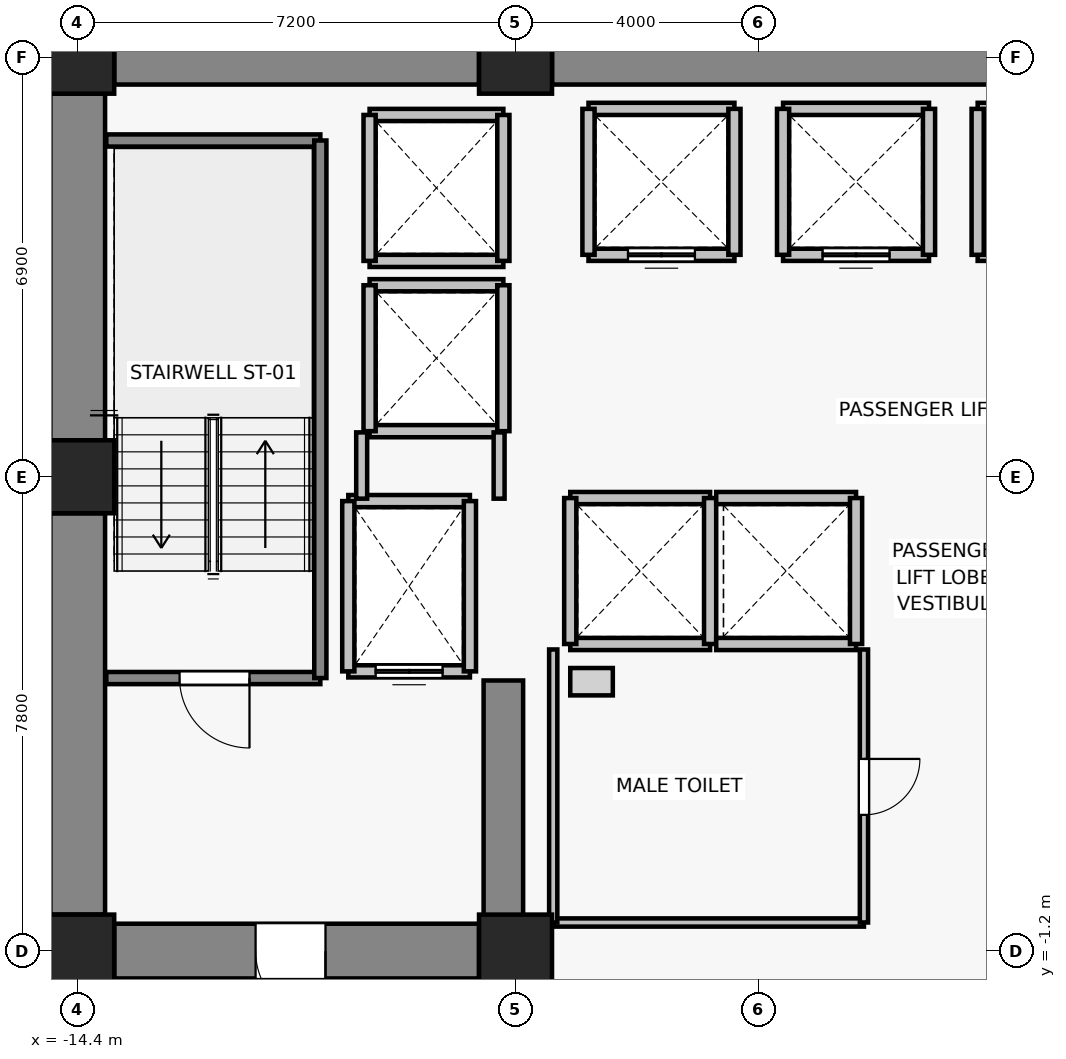
"""IFC4 building model, lengths in metres.
Left out: names, types, materials, properties, quantities, classifications, styles, units other than length and angle.
Written with IfcOpenShell. Run it as: python <this file> out.ifc"""

import sys

from ifc_helpers import new_model, si_unit, direction, frame, frame_2d, origin, origin_2d, place, context, subcontext, project, spatial, rectangle, extrude, source, transform, mapped, element, fill, save


model = new_model("IFC4")
c1 = context("Model", 3, precision=1e-05, world=origin(), true_north=direction((0.0, 1.0)))
c2 = subcontext(c1, "Body", "Model", "MODEL_VIEW")
j1 = project(units=[si_unit("LENGTHUNIT", "METRE"), si_unit("PLANEANGLEUNIT", "RADIAN")], contexts=[c1])
p1 = place(None, origin())
s1 = spatial("IfcSite", under=j1, at=p1, CompositionType="ELEMENT")
p2 = place(p1, origin())
s2 = spatial("IfcBuilding", under=s1, at=p2, CompositionType="ELEMENT")
p3 = place(p2, frame((0.0, 0.0, 73.6)))
s3 = spatial("IfcBuildingStorey", under=s2, at=p3, CompositionType="ELEMENT", Elevation=73.6)
for number, where, z_axis, x_axis in (
    (1, (-14.4, -1.2, 0.0), (0.0, 0.0, 1.0), (1.0, 0.0, 0.0)),
    (2, (-7.2, -1.2, 0.0), (0.0, 0.0, 1.0), (1.0, 0.0, 0.0)),
    (3, (-14.4, 6.6, 0.0), (0.0, 0.0, 1.0), (1.0, 0.0, 0.0)),
    (4, (-14.4, 13.5, 0.0), (0.0, 0.0, 1.0), (1.0, 0.0, 0.0)),
    (5, (-7.2, 13.5, 0.0), (0.0, 0.0, 1.0), (1.0, 0.0, 0.0)),
):
    element("IfcColumn", number, at=place(p3, frame(where, z_axis=z_axis, x_axis=x_axis)), inside=s3, PredefinedType="COLUMN", context=c2, shape_type="SweptSolid", body=[
        extrude(rectangle(XDim=1.2, YDim=1.2, at=origin_2d()), origin(), (0.0, 0.0, 1.0), 3.3),
    ])
p4 = place(p3, frame((-13.8, 13.5, 0.0), z_axis=(0.0, 0.0, 1.0), x_axis=(1.0, 0.0, 0.0)))
e6 = element("IfcWall", 6, at=p4, inside=s3, PredefinedType="SHEAR", context=c2, shape_type="SweptSolid", body=[
    extrude(rectangle(XDim=6.0, YDim=0.9, at=frame_2d((3.0, 0.0))), origin(), (0.0, 0.0, 1.0), 3.075),
])
p5 = place(p3, frame((-6.6, 13.5, 0.0), z_axis=(0.0, 0.0, 1.0), x_axis=(1.0, 0.0, 0.0)))
e7 = element("IfcWall", 7, at=p5, inside=s3, PredefinedType="SHEAR", context=c2, shape_type="SweptSolid", body=[
    extrude(rectangle(XDim=13.2, YDim=0.9, at=frame_2d((6.6, 0.0))), origin(), (0.0, 0.0, 1.0), 3.075),
])
p6 = place(p3, frame((-14.4, -0.6, 0.0), z_axis=(0.0, 0.0, 1.0), x_axis=(0.0, 1.0, 0.0)))
e8 = element("IfcWall", 8, at=p6, inside=s3, PredefinedType="SHEAR", context=c2, shape_type="SweptSolid", body=[
    extrude(rectangle(XDim=6.6, YDim=0.9, at=frame_2d((3.3, 0.0))), origin(), (0.0, 0.0, 1.0), 3.075),
])
p7 = place(p3, frame((-14.4, 7.2, 0.0), z_axis=(0.0, 0.0, 1.0), x_axis=(0.0, 1.0, 0.0)))
e9 = element("IfcWall", 9, at=p7, inside=s3, PredefinedType="SHEAR", context=c2, shape_type="SweptSolid", body=[
    extrude(rectangle(XDim=5.7, YDim=0.9, at=frame_2d((2.85, 0.0))), origin(), (0.0, 0.0, 1.0), 3.075),
])
p8 = place(p3, frame((-7.8, -1.2, 0.0), z_axis=(0.0, 0.0, 1.0), x_axis=(-1.0, 0.0, 0.0)))
e10 = element("IfcWall", 10, at=p8, inside=s3, PredefinedType="SHEAR", context=c2, shape_type="SweptSolid", body=[
    extrude(rectangle(XDim=6.0, YDim=0.9, at=frame_2d((3.0, 0.0))), origin(), (0.0, 0.0, 1.0), 3.075),
])
p9 = place(p8, frame((2.525, 0.0, 0.0)))
e11 = element("IfcOpeningElement", 11, at=p9, cuts=e10, PredefinedType="OPENING", context=c2, shape_type="SweptSolid", body=[
    extrude(rectangle(XDim=1.15, YDim=2.15, at=frame_2d((0.575, 1.075))), frame((0.0, 0.46, 0.0), z_axis=(0.0, -1.0, 0.0), x_axis=(1.0, 0.0, 0.0)), (0.0, 0.0, 1.0), 0.92),
])
p10 = place(p3, frame((-7.4, -0.75, 0.0), z_axis=(0.0, 0.0, 1.0), x_axis=(0.0, 1.0, 0.0)))
e12 = element("IfcWall", 12, at=p10, inside=s3, PredefinedType="SHEAR", context=c2, shape_type="SweptSolid", body=[
    extrude(rectangle(XDim=4.0, YDim=0.65, at=frame_2d((2.0, 0.0))), origin(), (0.0, 0.0, 1.0), 3.075),
])
p11 = place(p3, frame((-7.95, 3.4, 0.0), z_axis=(0.0, 0.0, 1.0), x_axis=(-1.0, 0.0, 0.0)))
e13 = element("IfcWall", 13, at=p11, inside=s3, PredefinedType="SOLIDWALL", context=c2, shape_type="SweptSolid", body=[
    extrude(rectangle(XDim=2.0, YDim=0.2, at=frame_2d((1.0, 0.0))), origin(), (0.0, 0.0, 1.0), 3.075),
])
p12 = place(p11, frame((0.45, 0.0, 0.0)))
e14 = element("IfcOpeningElement", 14, at=p12, cuts=e13, PredefinedType="OPENING", context=c2, shape_type="SweptSolid", body=[
    extrude(rectangle(XDim=1.1, YDim=2.2, at=frame_2d((0.55, 1.1))), frame((0.0, 0.11, 0.0), z_axis=(0.0, -1.0, 0.0), x_axis=(1.0, 0.0, 0.0)), (0.0, 0.0, 1.0), 0.22),
])
p13 = place(p3, frame((-9.95, 6.2, 0.0), z_axis=(0.0, 0.0, 1.0), x_axis=(1.0, 0.0, 0.0)))
e15 = element("IfcWall", 15, at=p13, inside=s3, PredefinedType="SOLIDWALL", context=c2, shape_type="SweptSolid", body=[
    extrude(rectangle(XDim=2.0, YDim=0.2, at=frame_2d((1.0, 0.0))), origin(), (0.0, 0.0, 1.0), 3.075),
])
for number, where, z_axis, x_axis in (
    (16, (-9.95, 3.4, 0.0), (0.0, 0.0, 1.0), (0.0, 1.0, 0.0)),
    (17, (-7.95, 6.2, 0.0), (0.0, 0.0, 1.0), (0.0, -1.0, 0.0)),
):
    element("IfcWall", number, at=place(p3, frame(where, z_axis=z_axis, x_axis=x_axis)), inside=s3, PredefinedType="SOLIDWALL", context=c2, shape_type="SweptSolid", body=[
        extrude(rectangle(XDim=2.8, YDim=0.2, at=frame_2d((1.4, 0.0))), origin(), (0.0, 0.0, 1.0), 3.075),
    ])
p14 = place(p3, frame((-3.6, 10.25, 0.0), z_axis=(0.0, 0.0, 1.0), x_axis=(-1.0, 0.0, 0.0)))
e18 = element("IfcWall", 18, at=p14, inside=s3, PredefinedType="SOLIDWALL", context=c2, shape_type="SweptSolid", body=[
    extrude(rectangle(XDim=2.4, YDim=0.2, at=frame_2d((1.2, 0.0))), origin(), (0.0, 0.0, 1.0), 3.075),
])
p15 = place(p14, frame((0.65, 0.0, 0.0)))
e19 = element("IfcOpeningElement", 19, at=p15, cuts=e18, PredefinedType="OPENING", context=c2, shape_type="SweptSolid", body=[
    extrude(rectangle(XDim=1.1, YDim=2.2, at=frame_2d((0.55, 1.1))), frame((0.0, 0.11, 0.0), z_axis=(0.0, -1.0, 0.0), x_axis=(1.0, 0.0, 0.0)), (0.0, 0.0, 1.0), 0.22),
])
for number, where, z_axis, x_axis in (
    (20, (-6.0, 12.65, 0.0), (0.0, 0.0, 1.0), (1.0, 0.0, 0.0)),
    (21, (-6.0, 10.25, 0.0), (0.0, 0.0, 1.0), (0.0, 1.0, 0.0)),
    (22, (-3.6, 12.65, 0.0), (0.0, 0.0, 1.0), (0.0, -1.0, 0.0)),
):
    element("IfcWall", number, at=place(p3, frame(where, z_axis=z_axis, x_axis=x_axis)), inside=s3, PredefinedType="SOLIDWALL", context=c2, shape_type="SweptSolid", body=[
        extrude(rectangle(XDim=2.4, YDim=0.2, at=frame_2d((1.2, 0.0))), origin(), (0.0, 0.0, 1.0), 3.075),
    ])
p16 = place(p3, frame((-0.4, 10.25, 0.0), z_axis=(0.0, 0.0, 1.0), x_axis=(-1.0, 0.0, 0.0)))
e23 = element("IfcWall", 23, at=p16, inside=s3, PredefinedType="SOLIDWALL", context=c2, shape_type="SweptSolid", body=[
    extrude(rectangle(XDim=2.4, YDim=0.2, at=frame_2d((1.2, 0.0))), origin(), (0.0, 0.0, 1.0), 3.075),
])
p17 = place(p16, frame((0.65, 0.0, 0.0)))
e24 = element("IfcOpeningElement", 24, at=p17, cuts=e23, PredefinedType="OPENING", context=c2, shape_type="SweptSolid", body=[
    extrude(rectangle(XDim=1.1, YDim=2.2, at=frame_2d((0.55, 1.1))), frame((0.0, 0.11, 0.0), z_axis=(0.0, -1.0, 0.0), x_axis=(1.0, 0.0, 0.0)), (0.0, 0.0, 1.0), 0.22),
])
p18 = place(p3, frame((-2.8, 12.65, 0.0), z_axis=(0.0, 0.0, 1.0), x_axis=(1.0, 0.0, 0.0)))
e25 = element("IfcWall", 25, at=p18, inside=s3, PredefinedType="SOLIDWALL", context=c2, shape_type="SweptSolid", body=[
    extrude(rectangle(XDim=2.4, YDim=0.2, at=frame_2d((1.2, 0.0))), origin(), (0.0, 0.0, 1.0), 3.075),
])
for number, where, z_axis, x_axis in (
    (26, (-2.8, 10.25, 0.0), (0.0, 0.0, 1.0), (0.0, 1.0, 0.0)),
    (27, (-0.4, 12.65, 0.0), (0.0, 0.0, 1.0), (0.0, -1.0, 0.0)),
):
    element("IfcWall", number, at=place(p3, frame(where, z_axis=z_axis, x_axis=x_axis)), inside=s3, PredefinedType="SOLIDWALL", context=c2, shape_type="SweptSolid", body=[
        extrude(rectangle(XDim=2.4, YDim=0.2, at=frame_2d((1.2, 0.0))), origin(), (0.0, 0.0, 1.0), 3.075),
    ])
p19 = place(p3, frame((2.8, 10.25, 0.0), z_axis=(0.0, 0.0, 1.0), x_axis=(-1.0, 0.0, 0.0)))
e28 = element("IfcWall", 28, at=p19, inside=s3, PredefinedType="SOLIDWALL", context=c2, shape_type="SweptSolid", body=[
    extrude(rectangle(XDim=2.4, YDim=0.2, at=frame_2d((1.2, 0.0))), origin(), (0.0, 0.0, 1.0), 3.075),
])
p20 = place(p19, frame((0.65, 0.0, 0.0)))
e29 = element("IfcOpeningElement", 29, at=p20, cuts=e28, PredefinedType="OPENING", context=c2, shape_type="SweptSolid", body=[
    extrude(rectangle(XDim=1.1, YDim=2.2, at=frame_2d((0.55, 1.1))), frame((0.0, 0.11, 0.0), z_axis=(0.0, -1.0, 0.0), x_axis=(1.0, 0.0, 0.0)), (0.0, 0.0, 1.0), 0.22),
])
p21 = place(p3, frame((0.4, 12.65, 0.0), z_axis=(0.0, 0.0, 1.0), x_axis=(1.0, 0.0, 0.0)))
e30 = element("IfcWall", 30, at=p21, inside=s3, PredefinedType="SOLIDWALL", context=c2, shape_type="SweptSolid", body=[
    extrude(rectangle(XDim=2.4, YDim=0.2, at=frame_2d((1.2, 0.0))), origin(), (0.0, 0.0, 1.0), 3.075),
])
p22 = place(p3, frame((0.4, 10.25, 0.0), z_axis=(0.0, 0.0, 1.0), x_axis=(0.0, 1.0, 0.0)))
e31 = element("IfcWall", 31, at=p22, inside=s3, PredefinedType="SOLIDWALL", context=c2, shape_type="SweptSolid", body=[
    extrude(rectangle(XDim=2.4, YDim=0.2, at=frame_2d((1.2, 0.0))), origin(), (0.0, 0.0, 1.0), 3.075),
])
for number, where, z_axis, x_axis in (
    (32, (-4.0, 3.85, 0.0), (0.0, 0.0, 1.0), (-1.0, 0.0, 0.0)),
    (33, (-6.3, 6.25, 0.0), (0.0, 0.0, 1.0), (1.0, 0.0, 0.0)),
):
    element("IfcWall", number, at=place(p3, frame(where, z_axis=z_axis, x_axis=x_axis)), inside=s3, PredefinedType="SOLIDWALL", context=c2, shape_type="SweptSolid", body=[
        extrude(rectangle(XDim=2.3, YDim=0.2, at=frame_2d((1.15, 0.0))), origin(), (0.0, 0.0, 1.0), 3.075),
    ])
for number, where, z_axis, x_axis in (
    (34, (-6.3, 3.85, 0.0), (0.0, 0.0, 1.0), (0.0, 1.0, 0.0)),
    (35, (-4.0, 6.25, 0.0), (0.0, 0.0, 1.0), (0.0, -1.0, 0.0)),
):
    element("IfcWall", number, at=place(p3, frame(where, z_axis=z_axis, x_axis=x_axis)), inside=s3, PredefinedType="SOLIDWALL", context=c2, shape_type="SweptSolid", body=[
        extrude(rectangle(XDim=2.4, YDim=0.2, at=frame_2d((1.2, 0.0))), origin(), (0.0, 0.0, 1.0), 3.075),
    ])
for number, where, z_axis, x_axis in (
    (36, (-1.6, 3.85, 0.0), (0.0, 0.0, 1.0), (-1.0, 0.0, 0.0)),
    (37, (-3.9, 6.25, 0.0), (0.0, 0.0, 1.0), (1.0, 0.0, 0.0)),
):
    element("IfcWall", number, at=place(p3, frame(where, z_axis=z_axis, x_axis=x_axis)), inside=s3, PredefinedType="SOLIDWALL", context=c2, shape_type="SweptSolid", body=[
        extrude(rectangle(XDim=2.3, YDim=0.2, at=frame_2d((1.15, 0.0))), origin(), (0.0, 0.0, 1.0), 3.075),
    ])
p23 = place(p3, frame((-1.6, 6.25, 0.0), z_axis=(0.0, 0.0, 1.0), x_axis=(0.0, -1.0, 0.0)))
e38 = element("IfcWall", 38, at=p23, inside=s3, PredefinedType="SOLIDWALL", context=c2, shape_type="SweptSolid", body=[
    extrude(rectangle(XDim=2.4, YDim=0.2, at=frame_2d((1.2, 0.0))), origin(), (0.0, 0.0, 1.0), 3.075),
])
for number, where, z_axis, x_axis in (
    (39, (-7.4, 7.35, 0.0), (0.0, 0.0, 1.0), (-1.0, 0.0, 0.0)),
    (40, (-9.6, 9.75, 0.0), (0.0, 0.0, 1.0), (1.0, 0.0, 0.0)),
):
    element("IfcWall", number, at=place(p3, frame(where, z_axis=z_axis, x_axis=x_axis)), inside=s3, PredefinedType="SOLIDWALL", context=c2, shape_type="SweptSolid", body=[
        extrude(rectangle(XDim=2.2, YDim=0.2, at=frame_2d((1.1, 0.0))), origin(), (0.0, 0.0, 1.0), 2.465),
    ])
p24 = place(p3, frame((-9.6, 7.35, 0.0), z_axis=(0.0, 0.0, 1.0), x_axis=(0.0, 1.0, 0.0)))
e41 = element("IfcWall", 41, at=p24, inside=s3, PredefinedType="SOLIDWALL", context=c2, shape_type="SweptSolid", body=[
    extrude(rectangle(XDim=2.4, YDim=0.2, at=frame_2d((1.2, 0.0))), origin(), (0.0, 0.0, 1.0), 3.075),
])
p25 = place(p3, frame((-7.4, 9.75, 0.0), z_axis=(0.0, 0.0, 1.0), x_axis=(0.0, -1.0, 0.0)))
e42 = element("IfcWall", 42, at=p25, inside=s3, PredefinedType="SOLIDWALL", context=c2, shape_type="SweptSolid", body=[
    extrude(rectangle(XDim=2.4, YDim=0.2, at=frame_2d((1.2, 0.0))), origin(), (0.0, 0.0, 1.0), 2.465),
])
for number, where, z_axis, x_axis in (
    (43, (-7.4, 10.15, 0.0), (0.0, 0.0, 1.0), (-1.0, 0.0, 0.0)),
    (44, (-9.6, 12.55, 0.0), (0.0, 0.0, 1.0), (1.0, 0.0, 0.0)),
):
    element("IfcWall", number, at=place(p3, frame(where, z_axis=z_axis, x_axis=x_axis)), inside=s3, PredefinedType="SOLIDWALL", context=c2, shape_type="SweptSolid", body=[
        extrude(rectangle(XDim=2.2, YDim=0.2, at=frame_2d((1.1, 0.0))), origin(), (0.0, 0.0, 1.0), 2.465),
    ])
p26 = place(p3, frame((-9.6, 10.15, 0.0), z_axis=(0.0, 0.0, 1.0), x_axis=(0.0, 1.0, 0.0)))
e45 = element("IfcWall", 45, at=p26, inside=s3, PredefinedType="SOLIDWALL", context=c2, shape_type="SweptSolid", body=[
    extrude(rectangle(XDim=2.4, YDim=0.2, at=frame_2d((1.2, 0.0))), origin(), (0.0, 0.0, 1.0), 3.075),
])
p27 = place(p3, frame((-7.4, 12.55, 0.0), z_axis=(0.0, 0.0, 1.0), x_axis=(0.0, -1.0, 0.0)))
e46 = element("IfcWall", 46, at=p27, inside=s3, PredefinedType="SOLIDWALL", context=c2, shape_type="SweptSolid", body=[
    extrude(rectangle(XDim=2.4, YDim=0.2, at=frame_2d((1.2, 0.0))), origin(), (0.0, 0.0, 1.0), 2.465),
])
p28 = place(p3, frame((-10.41, 3.29, 0.0), z_axis=(0.0, 0.0, 1.0), x_axis=(-1.0, 0.0, 0.0)))
e47 = element("IfcWall", 47, at=p28, inside=s3, PredefinedType="SOLIDWALL", context=c2, shape_type="SweptSolid", body=[
    extrude(rectangle(XDim=3.52, YDim=0.2, at=frame_2d((1.76, 0.0))), origin(), (0.0, 0.0, 1.0), 3.075),
])
p29 = place(p28, frame((1.165, 0.0, 0.0)))
e48 = element("IfcOpeningElement", 48, at=p29, cuts=e47, PredefinedType="OPENING", context=c2, shape_type="SweptSolid", body=[
    extrude(rectangle(XDim=1.15, YDim=2.15, at=frame_2d((0.575, 1.075))), frame((0.0, 0.11, 0.0), z_axis=(0.0, -1.0, 0.0), x_axis=(1.0, 0.0, 0.0)), (0.0, 0.0, 1.0), 0.22),
])
p30 = place(p3, frame((-13.93, 12.13, 0.0), z_axis=(0.0, 0.0, 1.0), x_axis=(1.0, 0.0, 0.0)))
e49 = element("IfcWall", 49, at=p30, inside=s3, PredefinedType="SOLIDWALL", context=c2, shape_type="SweptSolid", body=[
    extrude(rectangle(XDim=3.52, YDim=0.2, at=frame_2d((1.76, 0.0))), origin(), (0.0, 0.0, 1.0), 3.075),
])
p31 = place(p3, frame((-10.41, 12.13, 0.0), z_axis=(0.0, 0.0, 1.0), x_axis=(0.0, -1.0, 0.0)))
e50 = element("IfcWall", 50, at=p31, inside=s3, PredefinedType="SOLIDWALL", context=c2, shape_type="SweptSolid", body=[
    extrude(rectangle(XDim=8.84, YDim=0.2, at=frame_2d((4.42, 0.0))), origin(), (0.0, 0.0, 1.0), 3.075),
])
p32 = place(p3, frame((-9.73, 6.24, 0.0), z_axis=(0.0, 0.0, 1.0), x_axis=(0.0, 1.0, 0.0)))
e51 = element("IfcWall", 51, at=p32, inside=s3, PredefinedType="PARTITIONING", context=c2, shape_type="SweptSolid", body=[
    extrude(rectangle(XDim=1.09, YDim=0.18, at=frame_2d((0.545, 0.0))), origin(), (0.0, 0.0, 1.0), 3.075),
])
p33 = place(p3, frame((-7.47, 7.33, 0.0), z_axis=(0.0, 0.0, 1.0), x_axis=(0.0, -1.0, 0.0)))
e52 = element("IfcWall", 52, at=p33, inside=s3, PredefinedType="PARTITIONING", context=c2, shape_type="SweptSolid", body=[
    extrude(rectangle(XDim=1.09, YDim=0.18, at=frame_2d((0.545, 0.0))), origin(), (0.0, 0.0, 1.0), 2.465),
])
p34 = place(p3, frame((-1.47, -0.73, 0.0), z_axis=(0.0, 0.0, 1.0), x_axis=(-1.0, 0.0, 0.0)))
e53 = element("IfcWall", 53, at=p34, inside=s3, PredefinedType="PARTITIONING", context=c2, shape_type="SweptSolid", body=[
    extrude(rectangle(XDim=5.11, YDim=0.135, at=frame_2d((2.555, 0.0))), origin(), (0.0, 0.0, 1.0), 3.075),
])
p35 = place(p3, frame((-6.58, -0.73, 0.0), z_axis=(0.0, 0.0, 1.0), x_axis=(0.0, 1.0, 0.0)))
e54 = element("IfcWall", 54, at=p35, inside=s3, PredefinedType="PARTITIONING", context=c2, shape_type="SweptSolid", body=[
    extrude(rectangle(XDim=4.49, YDim=0.135, at=frame_2d((2.245, 0.0))), origin(), (0.0, 0.0, 1.0), 3.075),
])
p36 = place(p3, frame((-1.47, 3.76, 0.0), z_axis=(0.0, 0.0, 1.0), x_axis=(0.0, -1.0, 0.0)))
e55 = element("IfcWall", 55, at=p36, inside=s3, PredefinedType="PARTITIONING", context=c2, shape_type="SweptSolid", body=[
    extrude(rectangle(XDim=4.49, YDim=0.135, at=frame_2d((2.245, 0.0))), origin(), (0.0, 0.0, 1.0), 3.075),
])
p37 = place(p36, frame((1.8, 0.0, 0.0)))
e56 = element("IfcOpeningElement", 56, at=p37, cuts=e55, PredefinedType="OPENING", context=c2, shape_type="SweptSolid", body=[
    extrude(rectangle(XDim=0.92, YDim=2.1, at=frame_2d((0.46, 1.05))), frame((0.0, 0.077, 0.0), z_axis=(0.0, -1.0, 0.0), x_axis=(1.0, 0.0, 0.0)), (0.0, 0.0, 1.0), 0.155),
])
m1 = source(origin(), c2, "Body", "SweptSolid", [
    extrude(rectangle(XDim=1.1, YDim=2.2, at=frame_2d((0.55, 1.1))), frame((0.0, 0.025, 0.0), z_axis=(0.0, -1.0, 0.0), x_axis=(1.0, 0.0, 0.0)), (0.0, 0.0, 1.0), 0.05),
])
p38 = place(p12, origin())
e57 = element("IfcDoor", 57, at=p38, inside=s3, OperationType="DOUBLE_DOOR_SLIDING", PredefinedType="DOOR", context=c2, shape_type="MappedRepresentation", body=[
    mapped(m1, transform((0.0, 0.0, 0.0), x_axis=(1.0, 0.0, 0.0), y_axis=(0.0, 1.0, 0.0), z_axis=(0.0, 0.0, 1.0), scale=1.0)),
])
fill(e14, e57)
p39 = place(p15, origin())
e58 = element("IfcDoor", 58, at=p39, inside=s3, OperationType="DOUBLE_DOOR_SLIDING", PredefinedType="DOOR", context=c2, shape_type="MappedRepresentation", body=[
    mapped(m1, transform((0.0, 0.0, 0.0), x_axis=(1.0, 0.0, 0.0), y_axis=(0.0, 1.0, 0.0), z_axis=(0.0, 0.0, 1.0), scale=1.0)),
])
fill(e19, e58)
p40 = place(p17, origin())
e59 = element("IfcDoor", 59, at=p40, inside=s3, OperationType="DOUBLE_DOOR_SLIDING", PredefinedType="DOOR", context=c2, shape_type="MappedRepresentation", body=[
    mapped(m1, transform((0.0, 0.0, 0.0), x_axis=(1.0, 0.0, 0.0), y_axis=(0.0, 1.0, 0.0), z_axis=(0.0, 0.0, 1.0), scale=1.0)),
])
fill(e24, e59)
m2 = source(origin(), c2, "Body", "SweptSolid", [
    extrude(rectangle(XDim=1.15, YDim=2.15, at=frame_2d((0.575, 1.075))), frame((0.0, 0.025, 0.0), z_axis=(0.0, -1.0, 0.0), x_axis=(1.0, 0.0, 0.0)), (0.0, 0.0, 1.0), 0.05),
])
p41 = place(p29, origin())
e60 = element("IfcDoor", 60, at=p41, inside=s3, OperationType="SINGLE_SWING_LEFT", PredefinedType="DOOR", context=c2, shape_type="MappedRepresentation", body=[
    mapped(m2, transform((0.0, 0.0, 0.0), x_axis=(1.0, 0.0, 0.0), y_axis=(0.0, 1.0, 0.0), z_axis=(0.0, 0.0, 1.0), scale=1.0)),
])
fill(e48, e60)
p42 = place(p9, origin())
e61 = element("IfcDoor", 61, at=p42, inside=s3, OperationType="SINGLE_SWING_LEFT", PredefinedType="DOOR", context=c2, shape_type="MappedRepresentation", body=[
    mapped(m2, transform((0.0, 0.0, 0.0), x_axis=(1.0, 0.0, 0.0), y_axis=(0.0, 1.0, 0.0), z_axis=(0.0, 0.0, 1.0), scale=1.0)),
])
fill(e11, e61)
m3 = source(origin(), c2, "Body", "SweptSolid", [
    extrude(rectangle(XDim=0.92, YDim=2.1, at=frame_2d((0.46, 1.05))), frame((0.0, 0.025, 0.0), z_axis=(0.0, -1.0, 0.0), x_axis=(1.0, 0.0, 0.0)), (0.0, 0.0, 1.0), 0.05),
])
p43 = place(p37, origin())
e62 = element("IfcDoor", 62, at=p43, inside=s3, OperationType="SINGLE_SWING_LEFT", PredefinedType="DOOR", context=c2, shape_type="MappedRepresentation", body=[
    mapped(m3, transform((0.0, 0.0, 0.0), x_axis=(1.0, 0.0, 0.0), y_axis=(0.0, 1.0, 0.0), z_axis=(0.0, 0.0, 1.0), scale=1.0)),
])
fill(e56, e62)
save(model, sys.argv[1])
